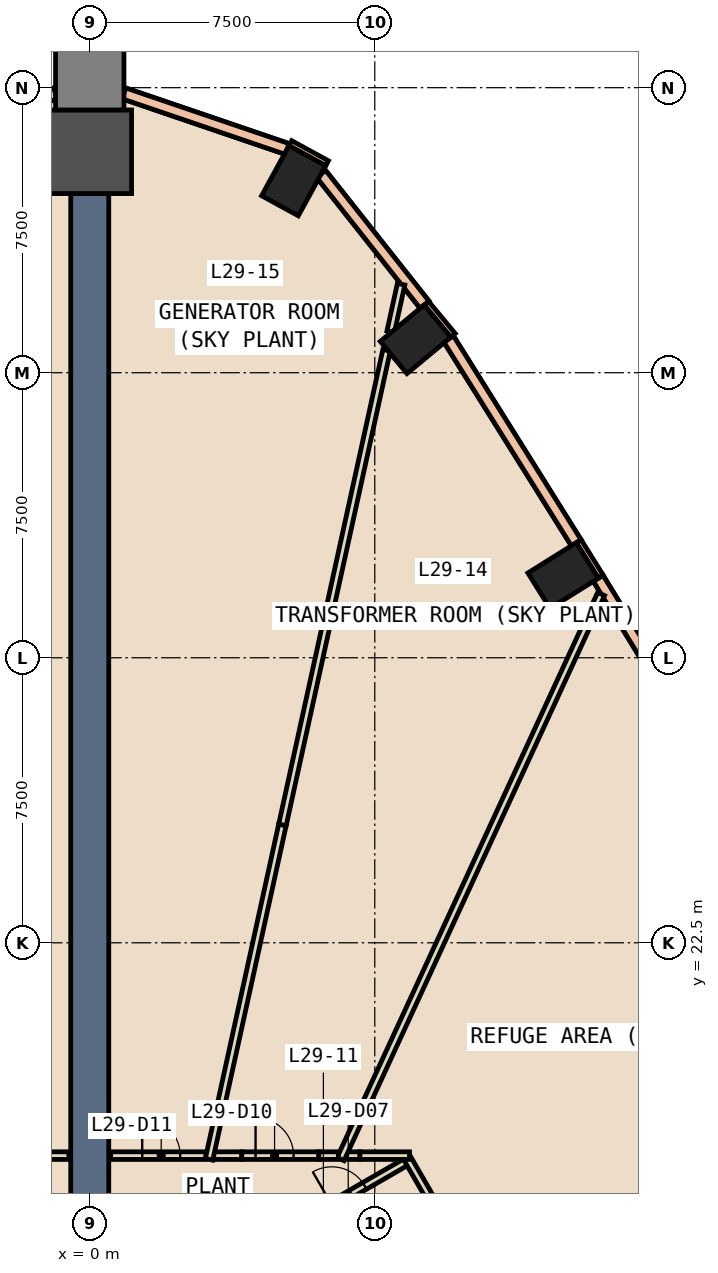
"""IFC4 building model, lengths in metres.
Left out: names, types, materials, properties, quantities, classifications, styles, units other than length and angle.
Written with IfcOpenShell. Run it as: python <this file> out.ifc"""

import sys

from ifc_helpers import new_model, si_unit, direction, frame, frame_2d, origin, origin_2d, place, context, subcontext, project, spatial, rectangle, extrude, element, fill, save


model = new_model("IFC4")
c1 = context("Model", 3, precision=1e-05, world=origin(), true_north=direction((0.0, 1.0)))
c2 = subcontext(c1, "Body", "Model", "MODEL_VIEW")
j1 = project(units=[si_unit("LENGTHUNIT", "METRE"), si_unit("PLANEANGLEUNIT", "RADIAN")], contexts=[c1])
p1 = place(None, origin())
s1 = spatial("IfcSite", under=j1, at=p1, CompositionType="ELEMENT")
p2 = place(p1, origin())
s2 = spatial("IfcBuilding", under=s1, at=p2, CompositionType="ELEMENT")
p3 = place(p2, frame((0.0, 0.0, 132.8)))
s3 = spatial("IfcBuildingStorey", under=s2, at=p3, CompositionType="ELEMENT", Elevation=132.8)
for number, where, z_axis, x_axis in (
    (1, (12.457, 32.162, -0.6), (0.0, 0.0, 1.0), (-0.53, 0.848, 0.0)),
    (2, (8.573, 38.38, -0.6), (0.0, 0.0, 1.0), (-0.638, 0.77, 0.0)),
    (3, (5.365, 42.551, -0.6), (0.0, 0.0, 1.0), (-0.877, 0.48, 0.0)),
):
    element("IfcColumn", number, at=place(p3, frame(where, z_axis=z_axis, x_axis=x_axis)), inside=s3, PredefinedType="COLUMN", context=c2, shape_type="SweptSolid", body=[
        extrude(rectangle(XDim=1.1, YDim=1.5, at=origin_2d()), origin(), (0.0, 0.0, 1.0), 5.4),
    ])
p4 = place(p3, frame((0.0, 43.314, -0.6), z_axis=(0.0, 0.0, 1.0), x_axis=(0.0, 1.0, 0.0)))
e4 = element("IfcColumn", 4, at=p4, inside=s3, PredefinedType="COLUMN", context=c2, shape_type="SweptSolid", body=[
    extrude(rectangle(XDim=2.2, YDim=2.2, at=origin_2d()), origin(), (0.0, 0.0, 1.0), 5.4),
])
p5 = place(p3, frame((0.0, 45.314, -0.6), z_axis=(0.0, 0.0, 1.0), x_axis=(0.0, 1.0, 0.0)))
e5 = element("IfcColumn", 5, at=p5, inside=s3, PredefinedType="COLUMN", context=c2, shape_type="SweptSolid", body=[
    extrude(rectangle(XDim=1.8, YDim=1.8, at=origin_2d()), origin(), (0.0, 0.0, 1.0), 5.4),
])
p6 = place(p3, frame((0.0, 14.5, 0.0), z_axis=(0.0, 0.0, 1.0), x_axis=(0.0, 1.0, 0.0)))
e6 = element("IfcWall", 6, at=p6, inside=s3, PredefinedType="SHEAR", context=c2, shape_type="SweptSolid", body=[
    extrude(rectangle(XDim=27.714, YDim=1.0, at=frame_2d((13.857, 0.0))), origin(), (0.0, 0.0, 1.0), 4.8),
])
p7 = place(p3, frame((6.244, 43.011, 0.0), z_axis=(0.0, 0.0, 1.0), x_axis=(-0.877411985247, 0.479737645119, 0.0)))
e7 = element("IfcWall", 7, at=p7, inside=s3, PredefinedType="STANDARD", context=c2, shape_type="SweptSolid", body=[
    extrude(rectangle(XDim=1.101, YDim=0.15, at=frame_2d((0.55, 0.0))), origin(), (0.0, 0.0, 1.0), 4.8),
])
p8 = place(p3, frame((13.448, 32.133, 0.0), z_axis=(0.0, 0.0, 1.0), x_axis=(-0.52997899071, 0.848010771987, 0.0)))
e8 = element("IfcWall", 8, at=p8, inside=s3, PredefinedType="STANDARD", context=c2, shape_type="SweptSolid", body=[
    extrude(rectangle(XDim=1.1, YDim=0.15, at=frame_2d((0.55, 0.0))), origin(), (0.0, 0.0, 1.0), 4.8),
])
p9 = place(p3, frame((9.559, 38.484, 0.0), z_axis=(0.0, 0.0, 1.0), x_axis=(-0.638566874111, 0.769566337159, 0.0)))
e9 = element("IfcWall", 9, at=p9, inside=s3, PredefinedType="STANDARD", context=c2, shape_type="SweptSolid", body=[
    extrude(rectangle(XDim=1.1, YDim=0.15, at=frame_2d((0.55, 0.0))), origin(), (0.0, 0.0, 1.0), 4.8),
])
p10 = place(p3, frame((16.574, 26.87, 0.0), z_axis=(0.0, 0.0, 1.0), x_axis=(-0.521983927326, 0.852955320995, 0.0)))
e10 = element("IfcWall", 10, at=p10, inside=s3, PredefinedType="STANDARD", context=c2, shape_type="SweptSolid", body=[
    extrude(rectangle(XDim=6.121, YDim=0.3, at=frame_2d((3.061, 0.0))), origin(), (0.0, 0.0, 1.0), 1.2),
])
p11 = place(p3, frame((16.574, 26.87, 4.0), z_axis=(0.0, 0.0, 1.0), x_axis=(-0.521983927326, 0.852955320995, 0.0)))
e11 = element("IfcWall", 11, at=p11, inside=s3, PredefinedType="STANDARD", context=c2, shape_type="SweptSolid", body=[
    extrude(rectangle(XDim=6.121, YDim=0.3, at=frame_2d((3.061, 0.0))), origin(), (0.0, 0.0, 1.0), 0.8),
])
p12 = place(p3, frame((12.801, 33.025, 0.0), z_axis=(0.0, 0.0, 1.0), x_axis=(-0.530612593955, 0.847614461378, 0.0)))
e12 = element("IfcWall", 12, at=p12, inside=s3, PredefinedType="STANDARD", context=c2, shape_type="SweptSolid", body=[
    extrude(rectangle(XDim=6.328, YDim=0.3, at=frame_2d((3.164, 0.0))), origin(), (0.0, 0.0, 1.0), 1.2),
])
p13 = place(p3, frame((12.801, 33.025, 4.0), z_axis=(0.0, 0.0, 1.0), x_axis=(-0.530612593955, 0.847614461378, 0.0)))
e13 = element("IfcWall", 13, at=p13, inside=s3, PredefinedType="STANDARD", context=c2, shape_type="SweptSolid", body=[
    extrude(rectangle(XDim=6.328, YDim=0.3, at=frame_2d((3.164, 0.0))), origin(), (0.0, 0.0, 1.0), 0.8),
])
p14 = place(p3, frame((8.81, 39.29, 0.0), z_axis=(0.0, 0.0, 1.0), x_axis=(-0.620374965717, 0.784305362669, 0.0)))
e14 = element("IfcWall", 14, at=p14, inside=s3, PredefinedType="STANDARD", context=c2, shape_type="SweptSolid", body=[
    extrude(rectangle(XDim=4.386, YDim=0.3, at=frame_2d((2.193, 0.0))), origin(), (0.0, 0.0, 1.0), 1.2),
])
p15 = place(p3, frame((8.81, 39.29, 4.0), z_axis=(0.0, 0.0, 1.0), x_axis=(-0.620374965717, 0.784305362669, 0.0)))
e15 = element("IfcWall", 15, at=p15, inside=s3, PredefinedType="STANDARD", context=c2, shape_type="SweptSolid", body=[
    extrude(rectangle(XDim=4.386, YDim=0.3, at=frame_2d((2.193, 0.0))), origin(), (0.0, 0.0, 1.0), 0.8),
])
p16 = place(p3, frame((5.196, 43.387, 0.0), z_axis=(0.0, 0.0, 1.0), x_axis=(-0.946630704027, 0.322320198241, 0.0)))
e16 = element("IfcWall", 16, at=p16, inside=s3, PredefinedType="STANDARD", context=c2, shape_type="SweptSolid", body=[
    extrude(rectangle(XDim=4.539, YDim=0.3, at=frame_2d((2.27, 0.0))), origin(), (0.0, 0.0, 1.0), 1.2),
])
p17 = place(p3, frame((5.196, 43.387, 4.0), z_axis=(0.0, 0.0, 1.0), x_axis=(-0.946630704027, 0.322320198241, 0.0)))
e17 = element("IfcWall", 17, at=p17, inside=s3, PredefinedType="STANDARD", context=c2, shape_type="SweptSolid", body=[
    extrude(rectangle(XDim=4.539, YDim=0.3, at=frame_2d((2.27, 0.0))), origin(), (0.0, 0.0, 1.0), 0.8),
])
p18 = place(p3, frame((-0.899, 44.85, 0.0), z_axis=(0.0, 0.0, 1.0), x_axis=(-0.946630704027, -0.322320198241, 0.0)))
e18 = element("IfcWall", 18, at=p18, inside=s3, PredefinedType="STANDARD", context=c2, shape_type="SweptSolid", body=[
    extrude(rectangle(XDim=4.539, YDim=0.3, at=frame_2d((2.27, 0.0))), origin(), (0.0, 0.0, 1.0), 1.2),
])
p19 = place(p3, frame((-0.899, 44.85, 4.0), z_axis=(0.0, 0.0, 1.0), x_axis=(-0.946630704027, -0.322320198241, 0.0)))
e19 = element("IfcWall", 19, at=p19, inside=s3, PredefinedType="STANDARD", context=c2, shape_type="SweptSolid", body=[
    extrude(rectangle(XDim=4.539, YDim=0.3, at=frame_2d((2.27, 0.0))), origin(), (0.0, 0.0, 1.0), 0.8),
])
p20 = place(p3, frame((6.223, 15.521, 0.0), z_axis=(0.0, 0.0, 1.0), x_axis=(0.866022959057, 0.500004234368, 0.0)))
e20 = element("IfcWall", 20, at=p20, inside=s3, PredefinedType="PARTITIONING", context=c2, shape_type="SweptSolid", body=[
    extrude(rectangle(XDim=2.5, YDim=0.2, at=frame_2d((1.25, 0.0))), origin(), (0.0, 0.0, 1.0), 4.8),
])
p21 = place(p20, frame((0.168, 0.0, 0.0)))
e21 = element("IfcOpeningElement", 21, at=p21, cuts=e20, PredefinedType="OPENING", context=c2, shape_type="SweptSolid", body=[
    extrude(rectangle(XDim=1.0, YDim=2.1, at=frame_2d((0.5, 1.05))), frame((0.0, 0.11, 0.0), z_axis=(0.0, -1.0, 0.0), x_axis=(1.0, 0.0, 0.0)), (0.0, 0.0, 1.0), 0.22),
])
p22 = place(p3, frame((8.338, 16.858, 0.0), z_axis=(0.0, 0.0, 1.0), x_axis=(0.499982693035, -0.866035395735, 0.0)))
e22 = element("IfcWall", 22, at=p22, inside=s3, PredefinedType="PARTITIONING", context=c2, shape_type="SweptSolid", body=[
    extrude(rectangle(XDim=7.2, YDim=0.2, at=frame_2d((3.6, 0.0))), origin(), (0.0, 0.0, 1.0), 4.8),
])
p23 = place(p22, frame((2.655, 0.0, 0.0)))
e23 = element("IfcOpeningElement", 23, at=p23, cuts=e22, PredefinedType="OPENING", context=c2, shape_type="SweptSolid", body=[
    extrude(rectangle(XDim=1.0, YDim=2.1, at=frame_2d((0.5, 1.05))), frame((0.0, 0.11, 0.0), z_axis=(0.0, -1.0, 0.0), x_axis=(1.0, 0.0, 0.0)), (0.0, 0.0, 1.0), 0.22),
])
p24 = place(p3, frame((6.741, 16.9, 0.0), z_axis=(0.0, 0.0, 1.0), x_axis=(1.0, 0.0, 0.0)))
e24 = element("IfcWall", 24, at=p24, inside=s3, PredefinedType="PARTITIONING", context=c2, shape_type="SweptSolid", body=[
    extrude(rectangle(XDim=0.368, YDim=0.2, at=frame_2d((0.184, 0.0))), origin(), (0.0, 0.0, 1.0), 2.4),
])
p25 = place(p3, frame((3.26, 16.9, 0.0), z_axis=(0.0, 0.0, 1.0), x_axis=(1.0, 0.0, 0.0)))
e25 = element("IfcWall", 25, at=p25, inside=s3, PredefinedType="PARTITIONING", context=c2, shape_type="SweptSolid", body=[
    extrude(rectangle(XDim=0.741, YDim=0.2, at=frame_2d((0.371, 0.0))), origin(), (0.0, 0.0, 1.0), 2.4),
])
p26 = place(p3, frame((0.55, 16.9, 0.0), z_axis=(0.0, 0.0, 1.0), x_axis=(1.0, 0.0, 0.0)))
e26 = element("IfcWall", 26, at=p26, inside=s3, PredefinedType="PARTITIONING", context=c2, shape_type="SweptSolid", body=[
    extrude(rectangle(XDim=2.51, YDim=0.2, at=frame_2d((1.255, 0.0))), origin(), (0.0, 0.0, 1.0), 4.8),
])
p27 = place(p26, frame((0.83, 0.0, 0.0)))
e27 = element("IfcOpeningElement", 27, at=p27, cuts=e26, PredefinedType="OPENING", context=c2, shape_type="SweptSolid", body=[
    extrude(rectangle(XDim=1.0, YDim=2.1, at=frame_2d((0.5, 1.05))), frame((0.0, 0.11, 0.0), z_axis=(0.0, -1.0, 0.0), x_axis=(1.0, 0.0, 0.0)), (0.0, 0.0, 1.0), 0.22),
])
p28 = place(p3, frame((6.599, 16.809, 0.0), z_axis=(0.0, 0.0, 1.0), x_axis=(0.418797177025, 0.908079800742, 0.0)))
e28 = element("IfcWall", 28, at=p28, inside=s3, PredefinedType="PARTITIONING", context=c2, shape_type="SweptSolid", body=[
    extrude(rectangle(XDim=16.373, YDim=0.2, at=frame_2d((8.187, 0.0))), origin(), (0.0, 0.0, 1.0), 2.4),
])
p29 = place(p3, frame((3.139, 16.802, 0.0), z_axis=(0.0, 0.0, 1.0), x_axis=(0.21434739217, 0.976757490614, 0.0)))
e29 = element("IfcWall", 29, at=p29, inside=s3, PredefinedType="PARTITIONING", context=c2, shape_type="SweptSolid", body=[
    extrude(rectangle(XDim=9.01, YDim=0.2, at=frame_2d((4.505, 0.0))), origin(), (0.0, 0.0, 1.0), 2.4),
])
p30 = place(p3, frame((7.918, 38.577, 0.0), z_axis=(0.0, 0.0, 1.0), x_axis=(0.214611118288, 0.976699579148, 0.0)))
e30 = element("IfcWall", 30, at=p30, inside=s3, PredefinedType="PARTITIONING", context=c2, shape_type="SweptSolid", body=[
    extrude(rectangle(XDim=1.282, YDim=0.2, at=frame_2d((0.641, 0.0))), origin(), (0.0, 0.0, 1.0), 4.8),
])
p31 = place(p3, frame((0.0, 44.434, 0.0), z_axis=(0.0, 0.0, 1.0), x_axis=(0.0, 1.0, 0.0)))
e31 = element("IfcWall", 31, at=p31, inside=s3, PredefinedType="PARTITIONING", context=c2, shape_type="SweptSolid", body=[
    extrude(rectangle(XDim=0.5, YDim=0.2, at=frame_2d((0.25, 0.0))), origin(), (0.0, 0.0, 1.0), 4.8),
])
p32 = place(p3, frame((7.109, 16.9, 0.0), z_axis=(0.0, 0.0, 1.0), x_axis=(1.0, 0.0, 0.0)))
e32 = element("IfcWall", 32, at=p32, inside=s3, PredefinedType="PARTITIONING", context=c2, shape_type="SweptSolid", body=[
    extrude(rectangle(XDim=1.305, YDim=0.2, at=frame_2d((0.653, 0.0))), origin(), (0.0, 0.0, 1.0), 4.8),
])
p33 = place(p3, frame((4.001, 16.9, 0.0), z_axis=(0.0, 0.0, 1.0), x_axis=(1.0, 0.0, 0.0)))
e33 = element("IfcWall", 33, at=p33, inside=s3, PredefinedType="PARTITIONING", context=c2, shape_type="SweptSolid", body=[
    extrude(rectangle(XDim=2.028, YDim=0.2, at=frame_2d((1.014, 0.0))), origin(), (0.0, 0.0, 1.0), 4.8),
])
p34 = place(p33, frame((0.362, 0.0, 0.0)))
e34 = element("IfcOpeningElement", 34, at=p34, cuts=e33, PredefinedType="OPENING", context=c2, shape_type="SweptSolid", body=[
    extrude(rectangle(XDim=1.0, YDim=2.1, at=frame_2d((0.5, 1.05))), frame((0.0, 0.11, 0.0), z_axis=(0.0, -1.0, 0.0), x_axis=(1.0, 0.0, 0.0)), (0.0, 0.0, 1.0), 0.22),
])
p35 = place(p3, frame((6.029, 16.9, 0.0), z_axis=(0.0, 0.0, 1.0), x_axis=(1.0, 0.0, 0.0)))
e35 = element("IfcWall", 35, at=p35, inside=s3, PredefinedType="PARTITIONING", context=c2, shape_type="SweptSolid", body=[
    extrude(rectangle(XDim=0.512, YDim=0.2, at=frame_2d((0.256, 0.0))), origin(), (0.0, 0.0, 1.0), 2.4),
])
p36 = place(p3, frame((20.432, 18.032, 0.0), z_axis=(0.0, 0.0, 1.0), x_axis=(-0.796104804042, -0.605158773366, 0.0)))
e36 = element("IfcWall", 36, at=p36, inside=s3, PredefinedType="PARTITIONING", context=c2, shape_type="SweptSolid", body=[
    extrude(rectangle(XDim=11.149, YDim=0.2, at=frame_2d((5.575, 0.0))), origin(), (0.0, 0.0, 1.0), 4.8),
])
p37 = place(p3, frame((5.07, 25.602, 0.0), z_axis=(0.0, 0.0, 1.0), x_axis=(0.214352205631, 0.976756434297, 0.0)))
e37 = element("IfcWall", 37, at=p37, inside=s3, PredefinedType="PARTITIONING", context=c2, shape_type="SweptSolid", body=[
    extrude(rectangle(XDim=12.787, YDim=0.2, at=frame_2d((6.394, 0.0))), origin(), (0.0, 0.0, 1.0), 4.8),
])
p38 = place(p3, frame((-1.337, 16.9, 0.0), z_axis=(0.0, 0.0, 1.0), x_axis=(1.0, 0.0, 0.0)))
e38 = element("IfcWall", 38, at=p38, inside=s3, PredefinedType="PARTITIONING", context=c2, shape_type="SweptSolid", body=[
    extrude(rectangle(XDim=0.787, YDim=0.2, at=frame_2d((0.394, 0.0))), origin(), (0.0, 0.0, 1.0), 4.8),
])
p39 = place(p21, origin())
e39 = element("IfcDoor", 39, at=p39, inside=s3, OperationType="SINGLE_SWING_LEFT", PredefinedType="DOOR", context=c2, shape_type="SweptSolid", body=[
    extrude(rectangle(XDim=1.0, YDim=2.1, at=frame_2d((0.5, 1.05))), frame((0.0, 0.025, 0.0), z_axis=(0.0, -1.0, 0.0), x_axis=(1.0, 0.0, 0.0)), (0.0, 0.0, 1.0), 0.05),
])
fill(e21, e39)
p40 = place(p34, origin())
e40 = element("IfcDoor", 40, at=p40, inside=s3, OperationType="SINGLE_SWING_RIGHT", PredefinedType="DOOR", context=c2, shape_type="SweptSolid", body=[
    extrude(rectangle(XDim=1.0, YDim=2.1, at=frame_2d((0.5, 1.05))), frame((0.0, 0.025, 0.0), z_axis=(0.0, -1.0, 0.0), x_axis=(1.0, 0.0, 0.0)), (0.0, 0.0, 1.0), 0.05),
])
fill(e34, e40)
p41 = place(p27, origin())
e41 = element("IfcDoor", 41, at=p41, inside=s3, OperationType="SINGLE_SWING_LEFT", PredefinedType="DOOR", context=c2, shape_type="SweptSolid", body=[
    extrude(rectangle(XDim=1.0, YDim=2.1, at=frame_2d((0.5, 1.05))), frame((0.0, 0.025, 0.0), z_axis=(0.0, -1.0, 0.0), x_axis=(1.0, 0.0, 0.0)), (0.0, 0.0, 1.0), 0.05),
])
fill(e27, e41)
save(model, sys.argv[1])
